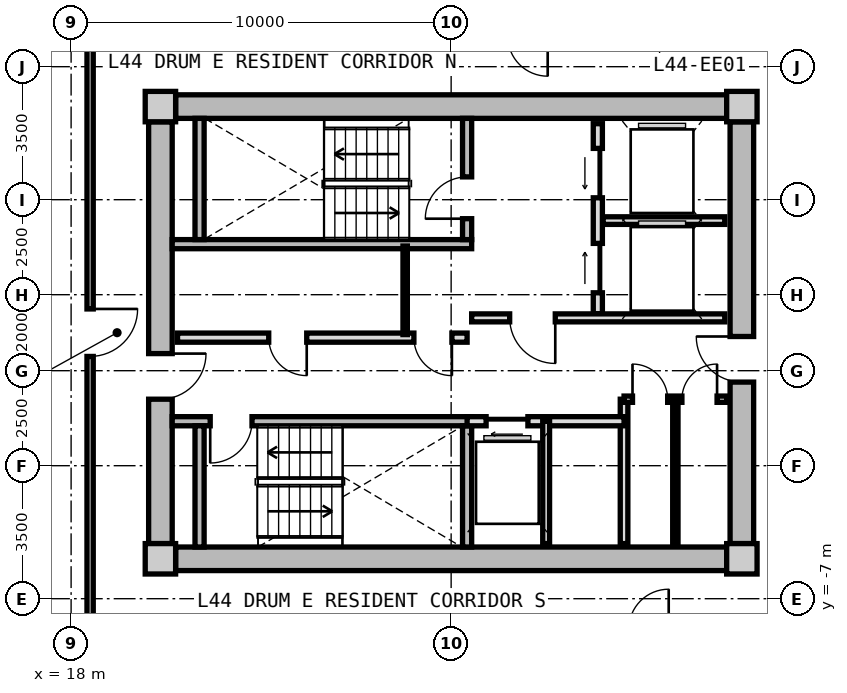
"""IFC4 building model, lengths in metres.
Left out: names, types, materials, properties, quantities, classifications, styles, units other than length and angle.
Written with IfcOpenShell. Run it as: python <this file> out.ifc"""

import sys

from ifc_helpers import new_model, si_unit, direction, frame, frame_2d, origin, origin_2d, place, context, subcontext, project, spatial, rectangle, extrude, source, transform, mapped, element, fill, save


model = new_model("IFC4")
c1 = context("Model", 3, precision=1e-05, world=origin(), true_north=direction((0.0, 1.0)))
c2 = subcontext(c1, "Body", "Model", "MODEL_VIEW")
j1 = project(units=[si_unit("LENGTHUNIT", "METRE"), si_unit("PLANEANGLEUNIT", "RADIAN")], contexts=[c1])
p1 = place(None, origin())
s1 = spatial("IfcSite", under=j1, at=p1, CompositionType="ELEMENT")
p2 = place(p1, origin())
s2 = spatial("IfcBuilding", under=s1, at=p2, CompositionType="ELEMENT")
p3 = place(p2, frame((0.0, 0.0, 143.45)))
s3 = spatial("IfcBuildingStorey", under=s2, at=p3, CompositionType="ELEMENT", Elevation=143.45)
m1 = source(origin(), c2, "Body", "SweptSolid", [
    extrude(rectangle(XDim=0.8, YDim=0.8, at=origin_2d()), origin(), (0.0, 0.0, 1.0), 3.05),
])
for number, where, z_axis, x_axis in (
    (1, (20.35, -5.95, 0.0), (0.0, 0.0, 1.0), (1.0, 0.0, 0.0)),
    (2, (35.65, -5.95, 0.0), (0.0, 0.0, 1.0), (1.0, 0.0, 0.0)),
    (3, (35.65, 5.95, 0.0), (0.0, 0.0, 1.0), (1.0, 0.0, 0.0)),
    (4, (20.35, 5.95, 0.0), (0.0, 0.0, 1.0), (1.0, 0.0, 0.0)),
):
    element("IfcColumn", number, at=place(p3, frame(where, z_axis=z_axis, x_axis=x_axis)), inside=s3, PredefinedType="COLUMN", context=c2, shape_type="MappedRepresentation", body=[
        mapped(m1, transform((0.0, 0.0, 0.0), x_axis=(1.0, 0.0, 0.0), y_axis=(0.0, 1.0, 0.0), z_axis=(0.0, 0.0, 1.0), scale=1.0)),
    ])
m2 = source(origin(), c2, "Body", "SweptSolid", [
    extrude(rectangle(XDim=14.5, YDim=0.62, at=frame_2d((7.25, 0.0))), origin(), (0.0, 0.0, 1.0), 2.81),
])
for number, where, z_axis, x_axis in (
    (5, (20.75, 5.95, 0.0), (0.0, 0.0, 1.0), (1.0, 0.0, 0.0)),
    (6, (35.25, -5.95, 0.0), (0.0, 0.0, 1.0), (-1.0, 0.0, 0.0)),
):
    element("IfcWall", number, at=place(p3, frame(where, z_axis=z_axis, x_axis=x_axis)), inside=s3, PredefinedType="SHEAR", context=c2, shape_type="MappedRepresentation", body=[
        mapped(m2, transform((0.0, 0.0, 0.0), x_axis=(1.0, 0.0, 0.0), y_axis=(0.0, 1.0, 0.0), z_axis=(0.0, 0.0, 1.0), scale=1.0)),
    ])
m3 = source(origin(), c2, "Body", "SweptSolid", [
    extrude(rectangle(XDim=11.1, YDim=0.62, at=frame_2d((5.55, 0.0))), origin(), (0.0, 0.0, 1.0), 2.81),
])
p4 = place(p3, frame((20.35, -5.55, 0.0), z_axis=(0.0, 0.0, 1.0), x_axis=(0.0, 1.0, 0.0)))
e7 = element("IfcWall", 7, at=p4, inside=s3, PredefinedType="SHEAR", context=c2, shape_type="MappedRepresentation", body=[
    mapped(m3, transform((0.0, 0.0, 0.0), x_axis=(1.0, 0.0, 0.0), y_axis=(0.0, 1.0, 0.0), z_axis=(0.0, 0.0, 1.0), scale=1.0)),
])
p5 = place(p4, frame((3.8, 0.0, 0.0)))
e8 = element("IfcOpeningElement", 8, at=p5, cuts=e7, PredefinedType="OPENING", context=c2, shape_type="SweptSolid", body=[
    extrude(rectangle(XDim=1.2, YDim=2.15, at=frame_2d((0.6, 1.075))), frame((0.0, 0.32, 0.0), z_axis=(0.0, -1.0, 0.0), x_axis=(1.0, 0.0, 0.0)), (0.0, 0.0, 1.0), 0.64),
])
p6 = place(p3, frame((35.65, 5.55, 0.0), z_axis=(0.0, 0.0, 1.0), x_axis=(0.0, -1.0, 0.0)))
e9 = element("IfcWall", 9, at=p6, inside=s3, PredefinedType="SHEAR", context=c2, shape_type="MappedRepresentation", body=[
    mapped(m3, transform((0.0, 0.0, 0.0), x_axis=(1.0, 0.0, 0.0), y_axis=(0.0, 1.0, 0.0), z_axis=(0.0, 0.0, 1.0), scale=1.0)),
])
p7 = place(p6, frame((5.65, 0.0, 0.0)))
e10 = element("IfcOpeningElement", 10, at=p7, cuts=e9, PredefinedType="OPENING", context=c2, shape_type="SweptSolid", body=[
    extrude(rectangle(XDim=1.2, YDim=2.15, at=frame_2d((0.6, 1.075))), frame((0.0, 0.32, 0.0), z_axis=(0.0, -1.0, 0.0), x_axis=(1.0, 0.0, 0.0)), (0.0, 0.0, 1.0), 0.64),
])
m4 = source(origin(), c2, "Body", "SweptSolid", [
    extrude(rectangle(XDim=7.88, YDim=0.24, at=frame_2d((3.94, 0.0))), origin(), (0.0, 0.0, 1.0), 2.81),
])
p8 = place(p3, frame((20.66, 2.33, 0.0), z_axis=(0.0, 0.0, 1.0), x_axis=(1.0, 0.0, 0.0)))
e11 = element("IfcWall", 11, at=p8, inside=s3, PredefinedType="PARTITIONING", context=c2, shape_type="MappedRepresentation", body=[
    mapped(m4, transform((0.0, 0.0, 0.0), x_axis=(1.0, 0.0, 0.0), y_axis=(0.0, 1.0, 0.0), z_axis=(0.0, 0.0, 1.0), scale=1.0)),
])
m5 = source(origin(), c2, "Body", "SweptSolid", [
    extrude(rectangle(XDim=3.19, YDim=0.24, at=frame_2d((1.595, 0.0))), origin(), (0.0, 0.0, 1.0), 2.81),
])
p9 = place(p3, frame((21.38, 2.45, 0.0), z_axis=(0.0, 0.0, 1.0), x_axis=(0.0, 1.0, 0.0)))
e12 = element("IfcWall", 12, at=p9, inside=s3, PredefinedType="PARTITIONING", context=c2, shape_type="MappedRepresentation", body=[
    mapped(m5, transform((0.0, 0.0, 0.0), x_axis=(1.0, 0.0, 0.0), y_axis=(0.0, 1.0, 0.0), z_axis=(0.0, 0.0, 1.0), scale=1.0)),
])
p10 = place(p3, frame((28.42, 2.45, 0.0), z_axis=(0.0, 0.0, 1.0), x_axis=(0.0, 1.0, 0.0)))
e13 = element("IfcWall", 13, at=p10, inside=s3, PredefinedType="PARTITIONING", context=c2, shape_type="MappedRepresentation", body=[
    mapped(m5, transform((0.0, 0.0, 0.0), x_axis=(1.0, 0.0, 0.0), y_axis=(0.0, 1.0, 0.0), z_axis=(0.0, 0.0, 1.0), scale=1.0)),
])
p11 = place(p10, frame((0.55, 0.0, 0.0)))
e14 = element("IfcOpeningElement", 14, at=p11, cuts=e13, PredefinedType="OPENING", context=c2, shape_type="SweptSolid", body=[
    extrude(rectangle(XDim=1.1, YDim=2.15, at=frame_2d((0.55, 1.075))), frame((0.0, 0.13, 0.0), z_axis=(0.0, -1.0, 0.0), x_axis=(1.0, 0.0, 0.0)), (0.0, 0.0, 1.0), 0.26),
])
p12 = place(p3, frame((20.66, -2.33, 0.0), z_axis=(0.0, 0.0, 1.0), x_axis=(1.0, 0.0, 0.0)))
e15 = element("IfcWall", 15, at=p12, inside=s3, PredefinedType="PARTITIONING", context=c2, shape_type="MappedRepresentation", body=[
    mapped(m4, transform((0.0, 0.0, 0.0), x_axis=(1.0, 0.0, 0.0), y_axis=(0.0, 1.0, 0.0), z_axis=(0.0, 0.0, 1.0), scale=1.0)),
])
p13 = place(p12, frame((1.0, 0.0, 0.0)))
e16 = element("IfcOpeningElement", 16, at=p13, cuts=e15, PredefinedType="OPENING", context=c2, shape_type="SweptSolid", body=[
    extrude(rectangle(XDim=1.1, YDim=2.15, at=frame_2d((0.55, 1.075))), frame((0.0, 0.13, 0.0), z_axis=(0.0, -1.0, 0.0), x_axis=(1.0, 0.0, 0.0)), (0.0, 0.0, 1.0), 0.26),
])
for number, where, z_axis, x_axis in (
    (17, (21.38, -5.64, 0.0), (0.0, 0.0, 1.0), (0.0, 1.0, 0.0)),
    (18, (28.42, -5.64, 0.0), (0.0, 0.0, 1.0), (0.0, 1.0, 0.0)),
):
    element("IfcWall", number, at=place(p3, frame(where, z_axis=z_axis, x_axis=x_axis)), inside=s3, PredefinedType="PARTITIONING", context=c2, shape_type="MappedRepresentation", body=[
        mapped(m5, transform((0.0, 0.0, 0.0), x_axis=(1.0, 0.0, 0.0), y_axis=(0.0, 1.0, 0.0), z_axis=(0.0, 0.0, 1.0), scale=1.0)),
    ])
m6 = source(origin(), c2, "Body", "SweptSolid", [
    extrude(rectangle(XDim=5.0, YDim=0.24, at=frame_2d((2.5, 0.0))), origin(), (0.0, 0.0, 1.0), 2.795),
])
p14 = place(p3, frame((31.86, 0.5, 0.0), z_axis=(0.0, 0.0, 1.0), x_axis=(0.0, 1.0, 0.0)))
e19 = element("IfcWall", 19, at=p14, inside=s3, PredefinedType="PARTITIONING", context=c2, shape_type="MappedRepresentation", body=[
    mapped(m6, transform((0.0, 0.0, 0.0), x_axis=(1.0, 0.0, 0.0), y_axis=(0.0, 1.0, 0.0), z_axis=(0.0, 0.0, 1.0), scale=1.0)),
])
p15 = place(p14, frame((3.05, 0.0, 0.0)))
e20 = element("IfcOpeningElement", 20, at=p15, cuts=e19, PredefinedType="OPENING", context=c2, shape_type="SweptSolid", body=[
    extrude(rectangle(XDim=1.3, YDim=2.2, at=frame_2d((0.65, 1.1))), frame((0.0, 0.13, 0.0), z_axis=(0.0, -1.0, 0.0), x_axis=(1.0, 0.0, 0.0)), (0.0, 0.0, 1.0), 0.26),
])
p16 = place(p14, frame((0.55, 0.0, 0.0)))
e21 = element("IfcOpeningElement", 21, at=p16, cuts=e19, PredefinedType="OPENING", context=c2, shape_type="SweptSolid", body=[
    extrude(rectangle(XDim=1.3, YDim=2.2, at=frame_2d((0.65, 1.1))), frame((0.0, 0.13, 0.0), z_axis=(0.0, -1.0, 0.0), x_axis=(1.0, 0.0, 0.0)), (0.0, 0.0, 1.0), 0.26),
])
m7 = source(origin(), c2, "Body", "SweptSolid", [
    extrude(rectangle(XDim=3.2, YDim=0.2, at=frame_2d((1.6, 0.0))), origin(), (0.0, 0.0, 1.0), 2.795),
])
p17 = place(p3, frame((32.0, 2.95, 0.0), z_axis=(0.0, 0.0, 1.0), x_axis=(1.0, 0.0, 0.0)))
e22 = element("IfcWall", 22, at=p17, inside=s3, PredefinedType="PARTITIONING", context=c2, shape_type="MappedRepresentation", body=[
    mapped(m7, transform((0.0, 0.0, 0.0), x_axis=(1.0, 0.0, 0.0), y_axis=(0.0, 1.0, 0.0), z_axis=(0.0, 0.0, 1.0), scale=1.0)),
])
m8 = source(origin(), c2, "Body", "SweptSolid", [
    extrude(rectangle(XDim=6.66, YDim=0.21, at=frame_2d((3.33, 0.0))), origin(), (0.0, 0.0, 1.0), 2.795),
])
p18 = place(p3, frame((28.54, 0.39, 0.0), z_axis=(0.0, 0.0, 1.0), x_axis=(1.0, 0.0, 0.0)))
e23 = element("IfcWall", 23, at=p18, inside=s3, PredefinedType="PARTITIONING", context=c2, shape_type="MappedRepresentation", body=[
    mapped(m8, transform((0.0, 0.0, 0.0), x_axis=(1.0, 0.0, 0.0), y_axis=(0.0, 1.0, 0.0), z_axis=(0.0, 0.0, 1.0), scale=1.0)),
])
p19 = place(p18, frame((1.0, 0.0, 0.0)))
e24 = element("IfcOpeningElement", 24, at=p19, cuts=e23, PredefinedType="OPENING", context=c2, shape_type="SweptSolid", body=[
    extrude(rectangle(XDim=1.2, YDim=2.15, at=frame_2d((0.6, 1.075))), frame((0.0, 0.115, 0.0), z_axis=(0.0, -1.0, 0.0), x_axis=(1.0, 0.0, 0.0)), (0.0, 0.0, 1.0), 0.23),
])
m9 = source(origin(), c2, "Body", "SweptSolid", [
    extrude(rectangle(XDim=7.62, YDim=0.24, at=frame_2d((3.81, 0.0))), origin(), (0.0, 0.0, 1.0), 2.795),
])
p20 = place(p3, frame((20.8, -0.13, 0.0), z_axis=(0.0, 0.0, 1.0), x_axis=(1.0, 0.0, 0.0)))
e25 = element("IfcWall", 25, at=p20, inside=s3, PredefinedType="PARTITIONING", context=c2, shape_type="MappedRepresentation", body=[
    mapped(m9, transform((0.0, 0.0, 0.0), x_axis=(1.0, 0.0, 0.0), y_axis=(0.0, 1.0, 0.0), z_axis=(0.0, 0.0, 1.0), scale=1.0)),
])
p21 = place(p20, frame((6.22, 0.0, 0.0)))
e26 = element("IfcOpeningElement", 26, at=p21, cuts=e25, PredefinedType="OPENING", context=c2, shape_type="SweptSolid", body=[
    extrude(rectangle(XDim=1.0, YDim=2.1, at=frame_2d((0.5, 1.05))), frame((0.0, 0.13, 0.0), z_axis=(0.0, -1.0, 0.0), x_axis=(1.0, 0.0, 0.0)), (0.0, 0.0, 1.0), 0.26),
])
p22 = place(p20, frame((2.4, 0.0, 0.0)))
e27 = element("IfcOpeningElement", 27, at=p22, cuts=e25, PredefinedType="OPENING", context=c2, shape_type="SweptSolid", body=[
    extrude(rectangle(XDim=1.0, YDim=2.1, at=frame_2d((0.5, 1.05))), frame((0.0, 0.13, 0.0), z_axis=(0.0, -1.0, 0.0), x_axis=(1.0, 0.0, 0.0)), (0.0, 0.0, 1.0), 0.26),
])
m10 = source(origin(), c2, "Body", "SweptSolid", [
    extrude(rectangle(XDim=2.33, YDim=0.115, at=frame_2d((1.165, 0.0))), origin(), (0.0, 0.0, 1.0), 2.795),
])
p23 = place(p3, frame((26.79, -0.05, 0.0), z_axis=(0.0, 0.0, 1.0), x_axis=(0.0, 1.0, 0.0)))
e28 = element("IfcWall", 28, at=p23, inside=s3, PredefinedType="PARTITIONING", context=c2, shape_type="MappedRepresentation", body=[
    mapped(m10, transform((0.0, 0.0, 0.0), x_axis=(1.0, 0.0, 0.0), y_axis=(0.0, 1.0, 0.0), z_axis=(0.0, 0.0, 1.0), scale=1.0)),
])
m11 = source(origin(), c2, "Body", "SweptSolid", [
    extrude(rectangle(XDim=3.8, YDim=0.2, at=frame_2d((1.9, 0.0))), origin(), (0.0, 0.0, 1.0), 2.795),
])
p24 = place(p3, frame((32.55, -5.55, 0.0), z_axis=(0.0, 0.0, 1.0), x_axis=(0.0, 1.0, 0.0)))
e29 = element("IfcWall", 29, at=p24, inside=s3, PredefinedType="PARTITIONING", context=c2, shape_type="MappedRepresentation", body=[
    mapped(m11, transform((0.0, 0.0, 0.0), x_axis=(1.0, 0.0, 0.0), y_axis=(0.0, 1.0, 0.0), z_axis=(0.0, 0.0, 1.0), scale=1.0)),
])
m12 = source(origin(), c2, "Body", "SweptSolid", [
    extrude(rectangle(XDim=4.13, YDim=0.24, at=frame_2d((2.065, 0.0))), origin(), (0.0, 0.0, 1.0), 2.795),
])
p25 = place(p3, frame((28.42, -2.33, 0.0), z_axis=(0.0, 0.0, 1.0), x_axis=(1.0, 0.0, 0.0)))
e30 = element("IfcWall", 30, at=p25, inside=s3, PredefinedType="PARTITIONING", context=c2, shape_type="MappedRepresentation", body=[
    mapped(m12, transform((0.0, 0.0, 0.0), x_axis=(1.0, 0.0, 0.0), y_axis=(0.0, 1.0, 0.0), z_axis=(0.0, 0.0, 1.0), scale=1.0)),
])
p26 = place(p25, frame((0.5, 0.0, 0.0)))
e31 = element("IfcOpeningElement", 31, at=p26, cuts=e30, PredefinedType="OPENING", context=c2, shape_type="SweptSolid", body=[
    extrude(rectangle(XDim=1.1, YDim=2.2, at=frame_2d((0.55, 1.1))), frame((0.0, 0.13, 0.0), z_axis=(0.0, -1.0, 0.0), x_axis=(1.0, 0.0, 0.0)), (0.0, 0.0, 1.0), 0.26),
])
m13 = source(origin(), c2, "Body", "SweptSolid", [
    extrude(rectangle(XDim=3.22, YDim=0.18, at=frame_2d((1.61, 0.0))), origin(), (0.0, 0.0, 1.0), 2.795),
])
p27 = place(p3, frame((30.5, -5.55, 0.0), z_axis=(0.0, 0.0, 1.0), x_axis=(0.0, 1.0, 0.0)))
e32 = element("IfcWall", 32, at=p27, inside=s3, PredefinedType="PARTITIONING", context=c2, shape_type="MappedRepresentation", body=[
    mapped(m13, transform((0.0, 0.0, 0.0), x_axis=(1.0, 0.0, 0.0), y_axis=(0.0, 1.0, 0.0), z_axis=(0.0, 0.0, 1.0), scale=1.0)),
])
m14 = source(origin(), c2, "Body", "SweptSolid", [
    extrude(rectangle(XDim=2.7, YDim=0.165, at=frame_2d((1.35, 0.0))), origin(), (0.0, 0.0, 1.0), 2.795),
])
p28 = place(p3, frame((32.55, -1.75, 0.0), z_axis=(0.0, 0.0, 1.0), x_axis=(1.0, 0.0, 0.0)))
e33 = element("IfcWall", 33, at=p28, inside=s3, PredefinedType="PARTITIONING", context=c2, shape_type="MappedRepresentation", body=[
    mapped(m14, transform((0.0, 0.0, 0.0), x_axis=(1.0, 0.0, 0.0), y_axis=(0.0, 1.0, 0.0), z_axis=(0.0, 0.0, 1.0), scale=1.0)),
])
p29 = place(p28, frame((0.222, 0.0, 0.0)))
e34 = element("IfcOpeningElement", 34, at=p29, cuts=e33, PredefinedType="OPENING", context=c2, shape_type="SweptSolid", body=[
    extrude(rectangle(XDim=0.925, YDim=2.1, at=frame_2d((0.462, 1.05))), frame((0.0, 0.093, 0.0), z_axis=(0.0, -1.0, 0.0), x_axis=(1.0, 0.0, 0.0)), (0.0, 0.0, 1.0), 0.185),
])
p30 = place(p28, frame((1.522, 0.0, 0.0)))
e35 = element("IfcOpeningElement", 35, at=p30, cuts=e33, PredefinedType="OPENING", context=c2, shape_type="SweptSolid", body=[
    extrude(rectangle(XDim=0.925, YDim=2.1, at=frame_2d((0.462, 1.05))), frame((0.0, 0.093, 0.0), z_axis=(0.0, -1.0, 0.0), x_axis=(1.0, 0.0, 0.0)), (0.0, 0.0, 1.0), 0.185),
])
m15 = source(origin(), c2, "Body", "SweptSolid", [
    extrude(rectangle(XDim=3.8, YDim=0.14, at=frame_2d((1.9, 0.0))), origin(), (0.0, 0.0, 1.0), 2.795),
])
p31 = place(p3, frame((33.9, -5.55, 0.0), z_axis=(0.0, 0.0, 1.0), x_axis=(0.0, 1.0, 0.0)))
e36 = element("IfcWall", 36, at=p31, inside=s3, PredefinedType="PARTITIONING", context=c2, shape_type="MappedRepresentation", body=[
    mapped(m15, transform((0.0, 0.0, 0.0), x_axis=(1.0, 0.0, 0.0), y_axis=(0.0, 1.0, 0.0), z_axis=(0.0, 0.0, 1.0), scale=1.0)),
])
m16 = source(origin(), c2, "Body", "SweptSolid", [
    extrude(rectangle(XDim=15.6, YDim=0.165, at=frame_2d((7.8, 0.0))), origin(), (0.0, 0.0, 1.0), 2.795),
])
p32 = place(p3, frame((18.5, -7.8, 0.0), z_axis=(0.0, 0.0, 1.0), x_axis=(0.0, 1.0, 0.0)))
e37 = element("IfcWall", 37, at=p32, inside=s3, PredefinedType="PARTITIONING", context=c2, shape_type="MappedRepresentation", body=[
    mapped(m16, transform((0.0, 0.0, 0.0), x_axis=(1.0, 0.0, 0.0), y_axis=(0.0, 1.0, 0.0), z_axis=(0.0, 0.0, 1.0), scale=1.0)),
])
p33 = place(p32, frame((7.175, 0.0, 0.0)))
e38 = element("IfcOpeningElement", 38, at=p33, cuts=e37, PredefinedType="OPENING", context=c2, shape_type="SweptSolid", body=[
    extrude(rectangle(XDim=1.25, YDim=2.2, at=frame_2d((0.625, 1.1))), frame((0.0, 0.093, 0.0), z_axis=(0.0, -1.0, 0.0), x_axis=(1.0, 0.0, 0.0)), (0.0, 0.0, 1.0), 0.185),
])
m17 = source(origin(), c2, "Body", "SweptSolid", [
    extrude(rectangle(XDim=1.1, YDim=2.15, at=frame_2d((0.55, 1.075))), frame((0.0, 0.025, 0.0), z_axis=(0.0, -1.0, 0.0), x_axis=(1.0, 0.0, 0.0)), (0.0, 0.0, 1.0), 0.05),
])
p34 = place(p11, origin())
e39 = element("IfcDoor", 39, at=p34, inside=s3, OperationType="SINGLE_SWING_LEFT", PredefinedType="DOOR", context=c2, shape_type="MappedRepresentation", body=[
    mapped(m17, transform((0.0, 0.0, 0.0), x_axis=(1.0, 0.0, 0.0), y_axis=(0.0, 1.0, 0.0), z_axis=(0.0, 0.0, 1.0), scale=1.0)),
])
fill(e14, e39)
p35 = place(p13, frame((1.1, 0.0, 0.0), z_axis=(0.0, 0.0, 1.0), x_axis=(-1.0, 0.0, 0.0)))
e40 = element("IfcDoor", 40, at=p35, inside=s3, OperationType="SINGLE_SWING_RIGHT", PredefinedType="DOOR", context=c2, shape_type="MappedRepresentation", body=[
    mapped(m17, transform((0.0, 0.0, 0.0), x_axis=(1.0, 0.0, 0.0), y_axis=(0.0, 1.0, 0.0), z_axis=(0.0, 0.0, 1.0), scale=1.0)),
])
fill(e16, e40)
m18 = source(origin(), c2, "Body", "SweptSolid", [
    extrude(rectangle(XDim=1.3, YDim=2.2, at=frame_2d((0.65, 1.1))), frame((0.0, 0.025, 0.0), z_axis=(0.0, -1.0, 0.0), x_axis=(1.0, 0.0, 0.0)), (0.0, 0.0, 1.0), 0.05),
])
p36 = place(p15, origin())
e41 = element("IfcDoor", 41, at=p36, inside=s3, OperationType="SLIDING_TO_LEFT", PredefinedType="DOOR", context=c2, shape_type="MappedRepresentation", body=[
    mapped(m18, transform((0.0, 0.0, 0.0), x_axis=(1.0, 0.0, 0.0), y_axis=(0.0, 1.0, 0.0), z_axis=(0.0, 0.0, 1.0), scale=1.0)),
])
fill(e20, e41)
p37 = place(p16, origin())
e42 = element("IfcDoor", 42, at=p37, inside=s3, OperationType="SLIDING_TO_RIGHT", PredefinedType="DOOR", context=c2, shape_type="MappedRepresentation", body=[
    mapped(m18, transform((0.0, 0.0, 0.0), x_axis=(1.0, 0.0, 0.0), y_axis=(0.0, 1.0, 0.0), z_axis=(0.0, 0.0, 1.0), scale=1.0)),
])
fill(e21, e42)
m19 = source(origin(), c2, "Body", "SweptSolid", [
    extrude(rectangle(XDim=1.2, YDim=2.15, at=frame_2d((0.6, 1.075))), frame((0.0, 0.025, 0.0), z_axis=(0.0, -1.0, 0.0), x_axis=(1.0, 0.0, 0.0)), (0.0, 0.0, 1.0), 0.05),
])
p38 = place(p19, frame((1.2, 0.0, 0.0), z_axis=(0.0, 0.0, 1.0), x_axis=(-1.0, 0.0, 0.0)))
e43 = element("IfcDoor", 43, at=p38, inside=s3, OperationType="SINGLE_SWING_LEFT", PredefinedType="DOOR", context=c2, shape_type="MappedRepresentation", body=[
    mapped(m19, transform((0.0, 0.0, 0.0), x_axis=(1.0, 0.0, 0.0), y_axis=(0.0, 1.0, 0.0), z_axis=(0.0, 0.0, 1.0), scale=1.0)),
])
fill(e24, e43)
p39 = place(p5, frame((1.2, 0.0, 0.0), z_axis=(0.0, 0.0, 1.0), x_axis=(-1.0, 0.0, 0.0)))
e44 = element("IfcDoor", 44, at=p39, inside=s3, OperationType="SINGLE_SWING_LEFT", PredefinedType="DOOR", context=c2, shape_type="MappedRepresentation", body=[
    mapped(m19, transform((0.0, 0.0, 0.0), x_axis=(1.0, 0.0, 0.0), y_axis=(0.0, 1.0, 0.0), z_axis=(0.0, 0.0, 1.0), scale=1.0)),
])
fill(e8, e44)
p40 = place(p7, frame((1.2, 0.0, 0.0), z_axis=(0.0, 0.0, 1.0), x_axis=(-1.0, 0.0, 0.0)))
e45 = element("IfcDoor", 45, at=p40, inside=s3, OperationType="SINGLE_SWING_RIGHT", PredefinedType="DOOR", context=c2, shape_type="MappedRepresentation", body=[
    mapped(m19, transform((0.0, 0.0, 0.0), x_axis=(1.0, 0.0, 0.0), y_axis=(0.0, 1.0, 0.0), z_axis=(0.0, 0.0, 1.0), scale=1.0)),
])
fill(e10, e45)
m20 = source(origin(), c2, "Body", "SweptSolid", [
    extrude(rectangle(XDim=1.0, YDim=2.1, at=frame_2d((0.5, 1.05))), frame((0.0, 0.025, 0.0), z_axis=(0.0, -1.0, 0.0), x_axis=(1.0, 0.0, 0.0)), (0.0, 0.0, 1.0), 0.05),
])
p41 = place(p21, frame((1.0, 0.0, 0.0), z_axis=(0.0, 0.0, 1.0), x_axis=(-1.0, 0.0, 0.0)))
e46 = element("IfcDoor", 46, at=p41, inside=s3, OperationType="SINGLE_SWING_LEFT", PredefinedType="DOOR", context=c2, shape_type="MappedRepresentation", body=[
    mapped(m20, transform((0.0, 0.0, 0.0), x_axis=(1.0, 0.0, 0.0), y_axis=(0.0, 1.0, 0.0), z_axis=(0.0, 0.0, 1.0), scale=1.0)),
])
fill(e26, e46)
p42 = place(p22, frame((1.0, 0.0, 0.0), z_axis=(0.0, 0.0, 1.0), x_axis=(-1.0, 0.0, 0.0)))
e47 = element("IfcDoor", 47, at=p42, inside=s3, OperationType="SINGLE_SWING_LEFT", PredefinedType="DOOR", context=c2, shape_type="MappedRepresentation", body=[
    mapped(m20, transform((0.0, 0.0, 0.0), x_axis=(1.0, 0.0, 0.0), y_axis=(0.0, 1.0, 0.0), z_axis=(0.0, 0.0, 1.0), scale=1.0)),
])
fill(e27, e47)
m21 = source(origin(), c2, "Body", "SweptSolid", [
    extrude(rectangle(XDim=1.1, YDim=2.2, at=frame_2d((0.55, 1.1))), frame((0.0, 0.025, 0.0), z_axis=(0.0, -1.0, 0.0), x_axis=(1.0, 0.0, 0.0)), (0.0, 0.0, 1.0), 0.05),
])
p43 = place(p26, frame((1.1, 0.0, 0.0), z_axis=(0.0, 0.0, 1.0), x_axis=(-1.0, 0.0, 0.0)))
e48 = element("IfcDoor", 48, at=p43, inside=s3, OperationType="SLIDING_TO_LEFT", PredefinedType="DOOR", context=c2, shape_type="MappedRepresentation", body=[
    mapped(m21, transform((0.0, 0.0, 0.0), x_axis=(1.0, 0.0, 0.0), y_axis=(0.0, 1.0, 0.0), z_axis=(0.0, 0.0, 1.0), scale=1.0)),
])
fill(e31, e48)
m22 = source(origin(), c2, "Body", "SweptSolid", [
    extrude(rectangle(XDim=0.925, YDim=2.1, at=frame_2d((0.462, 1.05))), frame((0.0, 0.025, 0.0), z_axis=(0.0, -1.0, 0.0), x_axis=(1.0, 0.0, 0.0)), (0.0, 0.0, 1.0), 0.05),
])
p44 = place(p29, origin())
e49 = element("IfcDoor", 49, at=p44, inside=s3, OperationType="SINGLE_SWING_LEFT", PredefinedType="DOOR", context=c2, shape_type="MappedRepresentation", body=[
    mapped(m22, transform((0.0, 0.0, 0.0), x_axis=(1.0, 0.0, 0.0), y_axis=(0.0, 1.0, 0.0), z_axis=(0.0, 0.0, 1.0), scale=1.0)),
])
fill(e34, e49)
p45 = place(p30, origin())
e50 = element("IfcDoor", 50, at=p45, inside=s3, OperationType="SINGLE_SWING_RIGHT", PredefinedType="DOOR", context=c2, shape_type="MappedRepresentation", body=[
    mapped(m22, transform((0.0, 0.0, 0.0), x_axis=(1.0, 0.0, 0.0), y_axis=(0.0, 1.0, 0.0), z_axis=(0.0, 0.0, 1.0), scale=1.0)),
])
fill(e35, e50)
m23 = source(origin(), c2, "Body", "SweptSolid", [
    extrude(rectangle(XDim=1.25, YDim=2.2, at=frame_2d((0.625, 1.1))), frame((0.0, 0.025, 0.0), z_axis=(0.0, -1.0, 0.0), x_axis=(1.0, 0.0, 0.0)), (0.0, 0.0, 1.0), 0.05),
])
p46 = place(p33, frame((1.25, 0.0, 0.0), z_axis=(0.0, 0.0, 1.0), x_axis=(-1.0, 0.0, 0.0)))
e51 = element("IfcDoor", 51, at=p46, inside=s3, OperationType="SINGLE_SWING_LEFT", PredefinedType="DOOR", context=c2, shape_type="MappedRepresentation", body=[
    mapped(m23, transform((0.0, 0.0, 0.0), x_axis=(1.0, 0.0, 0.0), y_axis=(0.0, 1.0, 0.0), z_axis=(0.0, 0.0, 1.0), scale=1.0)),
])
fill(e38, e51)
save(model, sys.argv[1])
